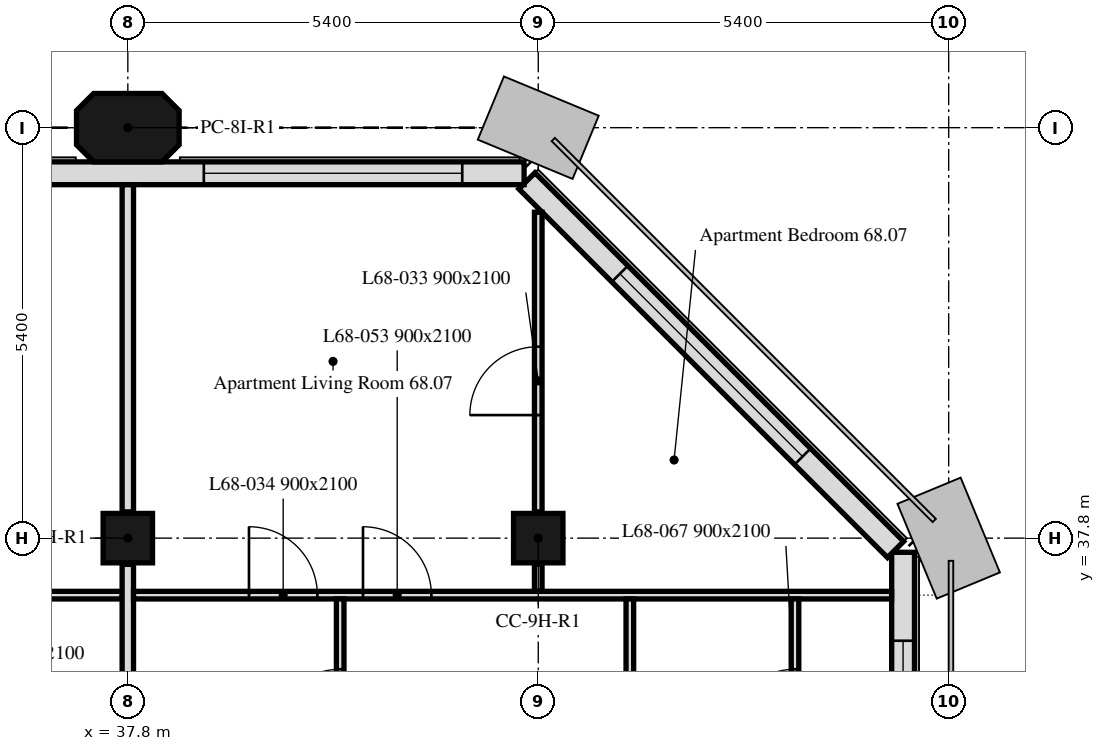
"""IFC4 building model, lengths in metres.
Left out: names, types, materials, properties, quantities, classifications, styles, units other than length and angle.
Written with IfcOpenShell. Run it as: python <this file> out.ifc"""

import sys

from ifc_helpers import new_model, si_unit, direction, frame, frame_2d, origin, origin_2d, place, context, subcontext, project, spatial, polyline, rectangle, outline, extrude, element, fill, save


model = new_model("IFC4")
c1 = context("Model", 3, precision=1e-05, world=origin(), true_north=direction((0.0, 1.0)))
c2 = subcontext(c1, "Body", "Model", "MODEL_VIEW")
j1 = project(units=[si_unit("LENGTHUNIT", "METRE"), si_unit("PLANEANGLEUNIT", "RADIAN")], contexts=[c1])
p1 = place(None, origin())
s1 = spatial("IfcSite", under=j1, at=p1, CompositionType="ELEMENT")
p2 = place(p1, origin())
s2 = spatial("IfcBuilding", under=s1, at=p2, CompositionType="ELEMENT")
p3 = place(p2, frame((0.0, 0.0, 278.5)))
s3 = spatial("IfcBuildingStorey", under=s2, at=p3, CompositionType="ELEMENT", Elevation=278.5)
for number, where, z_axis, x_axis in (
    (1, (37.8, 37.8, 0.0), (0.0, 0.0, 1.0), (1.0, 0.0, 0.0)),
    (2, (43.2, 37.8, 0.0), (0.0, 0.0, 1.0), (1.0, 0.0, 0.0)),
):
    element("IfcColumn", number, at=place(p3, frame(where, z_axis=z_axis, x_axis=x_axis)), inside=s3, PredefinedType="COLUMN", context=c2, shape_type="SweptSolid", body=[
        extrude(rectangle(XDim=0.65, YDim=0.65, at=origin_2d()), origin(), (0.0, 0.0, 1.0), 3.0),
    ])
p4 = place(p3, frame((37.8, 43.2, 0.0), z_axis=(0.0, 0.0, 1.0), x_axis=(1.0, 0.0, 0.0)))
e3 = element("IfcColumn", 3, at=p4, inside=s3, PredefinedType="COLUMN", context=c2, shape_type="SweptSolid", body=[
    extrude(outline(polyline([(-0.45, -0.45), (0.45, -0.45), (0.675, -0.225), (0.675, 0.225), (0.45, 0.45), (-0.45, 0.45), (-0.675, 0.225), (-0.675, -0.225), (-0.45, -0.45)])), origin(), (0.0, 0.0, 1.0), 3.0),
])
p5 = place(p3, frame((48.0, 5.586, 0.0), z_axis=(0.0, 0.0, 1.0), x_axis=(0.0, 1.0, 0.0)))
e4 = element("IfcWall", 4, at=p5, inside=s3, PredefinedType="SOLIDWALL", context=c2, shape_type="SweptSolid", body=[
    extrude(rectangle(XDim=32.027, YDim=0.3, at=frame_2d((16.014, 0.0))), origin(), (0.0, 0.0, 1.0), 3.0),
])
p6 = place(p5, frame((1.789, 0.0, 0.9)))
e5 = element("IfcOpeningElement", 5, at=p6, cuts=e4, PredefinedType="OPENING", context=c2, shape_type="SweptSolid", body=[
    extrude(rectangle(XDim=0.65, YDim=1.7, at=frame_2d((0.325, 0.85))), frame((0.0, 0.16, 0.0), z_axis=(0.0, -1.0, 0.0), x_axis=(1.0, 0.0, 0.0)), (0.0, 0.0, 1.0), 0.32),
])
p7 = place(p5, frame((2.764, 0.0, 0.9)))
e6 = element("IfcOpeningElement", 6, at=p7, cuts=e4, PredefinedType="OPENING", context=c2, shape_type="SweptSolid", body=[
    extrude(rectangle(XDim=1.1, YDim=1.7, at=frame_2d((0.55, 0.85))), frame((0.0, 0.16, 0.0), z_axis=(0.0, -1.0, 0.0), x_axis=(1.0, 0.0, 0.0)), (0.0, 0.0, 1.0), 0.32),
])
p8 = place(p5, frame((6.564, 0.0, 0.9)))
e7 = element("IfcOpeningElement", 7, at=p8, cuts=e4, PredefinedType="OPENING", context=c2, shape_type="SweptSolid", body=[
    extrude(rectangle(XDim=1.1, YDim=1.7, at=frame_2d((0.55, 0.85))), frame((0.0, 0.16, 0.0), z_axis=(0.0, -1.0, 0.0), x_axis=(1.0, 0.0, 0.0)), (0.0, 0.0, 1.0), 0.32),
])
p9 = place(p5, frame((7.989, 0.0, 0.9)))
e8 = element("IfcOpeningElement", 8, at=p9, cuts=e4, PredefinedType="OPENING", context=c2, shape_type="SweptSolid", body=[
    extrude(rectangle(XDim=0.65, YDim=1.7, at=frame_2d((0.325, 0.85))), frame((0.0, 0.16, 0.0), z_axis=(0.0, -1.0, 0.0), x_axis=(1.0, 0.0, 0.0)), (0.0, 0.0, 1.0), 0.32),
])
p10 = place(p5, frame((11.614, 0.0, 0.9)))
e9 = element("IfcOpeningElement", 9, at=p10, cuts=e4, PredefinedType="OPENING", context=c2, shape_type="SweptSolid", body=[
    extrude(rectangle(XDim=3.4, YDim=1.7, at=frame_2d((1.7, 0.85))), frame((0.0, 0.16, 0.0), z_axis=(0.0, -1.0, 0.0), x_axis=(1.0, 0.0, 0.0)), (0.0, 0.0, 1.0), 0.32),
])
p11 = place(p5, frame((17.364, 0.0, 0.9)))
e10 = element("IfcOpeningElement", 10, at=p11, cuts=e4, PredefinedType="OPENING", context=c2, shape_type="SweptSolid", body=[
    extrude(rectangle(XDim=1.1, YDim=1.7, at=frame_2d((0.55, 0.85))), frame((0.0, 0.16, 0.0), z_axis=(0.0, -1.0, 0.0), x_axis=(1.0, 0.0, 0.0)), (0.0, 0.0, 1.0), 0.32),
])
p12 = place(p5, frame((18.964, 0.0, 0.9)))
e11 = element("IfcOpeningElement", 11, at=p12, cuts=e4, PredefinedType="OPENING", context=c2, shape_type="SweptSolid", body=[
    extrude(rectangle(XDim=1.1, YDim=1.7, at=frame_2d((0.55, 0.85))), frame((0.0, 0.16, 0.0), z_axis=(0.0, -1.0, 0.0), x_axis=(1.0, 0.0, 0.0)), (0.0, 0.0, 1.0), 0.32),
])
p13 = place(p5, frame((22.414, 0.0, 0.9)))
e12 = element("IfcOpeningElement", 12, at=p13, cuts=e4, PredefinedType="OPENING", context=c2, shape_type="SweptSolid", body=[
    extrude(rectangle(XDim=3.4, YDim=1.7, at=frame_2d((1.7, 0.85))), frame((0.0, 0.16, 0.0), z_axis=(0.0, -1.0, 0.0), x_axis=(1.0, 0.0, 0.0)), (0.0, 0.0, 1.0), 0.32),
])
p14 = place(p5, frame((28.789, 0.0, 0.9)))
e13 = element("IfcOpeningElement", 13, at=p14, cuts=e4, PredefinedType="OPENING", context=c2, shape_type="SweptSolid", body=[
    extrude(rectangle(XDim=0.65, YDim=1.7, at=frame_2d((0.325, 0.85))), frame((0.0, 0.16, 0.0), z_axis=(0.0, -1.0, 0.0), x_axis=(1.0, 0.0, 0.0)), (0.0, 0.0, 1.0), 0.32),
])
p15 = place(p5, frame((29.764, 0.0, 0.9)))
e14 = element("IfcOpeningElement", 14, at=p15, cuts=e4, PredefinedType="OPENING", context=c2, shape_type="SweptSolid", body=[
    extrude(rectangle(XDim=1.1, YDim=1.7, at=frame_2d((0.55, 0.85))), frame((0.0, 0.16, 0.0), z_axis=(0.0, -1.0, 0.0), x_axis=(1.0, 0.0, 0.0)), (0.0, 0.0, 1.0), 0.32),
])
p16 = place(p3, frame((47.901, 37.65, 0.0), z_axis=(0.0, 0.0, 1.0), x_axis=(-0.707106781187, 0.707106781187, 0.0)))
e15 = element("IfcWall", 15, at=p16, inside=s3, PredefinedType="SOLIDWALL", context=c2, shape_type="SweptSolid", body=[
    extrude(rectangle(XDim=6.86, YDim=0.3, at=frame_2d((3.43, 0.0))), origin(), (0.0, 0.0, 1.0), 3.0),
])
p17 = place(p16, frame((1.73, 0.0, 0.9)))
e16 = element("IfcOpeningElement", 16, at=p17, cuts=e15, PredefinedType="OPENING", context=c2, shape_type="SweptSolid", body=[
    extrude(rectangle(XDim=3.4, YDim=1.7, at=frame_2d((1.7, 0.85))), frame((0.0, 0.16, 0.0), z_axis=(0.0, -1.0, 0.0), x_axis=(1.0, 0.0, 0.0)), (0.0, 0.0, 1.0), 0.32),
])
p18 = place(p3, frame((43.014, 42.6, 0.0), z_axis=(0.0, 0.0, 1.0), x_axis=(-1.0, 0.0, 0.0)))
e17 = element("IfcWall", 17, at=p18, inside=s3, PredefinedType="SOLIDWALL", context=c2, shape_type="SweptSolid", body=[
    extrude(rectangle(XDim=32.027, YDim=0.3, at=frame_2d((16.014, 0.0))), origin(), (0.0, 0.0, 1.0), 3.0),
])
p19 = place(p18, frame((0.814, 0.0, 0.9)))
e18 = element("IfcOpeningElement", 18, at=p19, cuts=e17, PredefinedType="OPENING", context=c2, shape_type="SweptSolid", body=[
    extrude(rectangle(XDim=3.4, YDim=1.7, at=frame_2d((1.7, 0.85))), frame((0.0, 0.16, 0.0), z_axis=(0.0, -1.0, 0.0), x_axis=(1.0, 0.0, 0.0)), (0.0, 0.0, 1.0), 0.32),
])
p20 = place(p18, frame((6.564, 0.0, 0.9)))
e19 = element("IfcOpeningElement", 19, at=p20, cuts=e17, PredefinedType="OPENING", context=c2, shape_type="SweptSolid", body=[
    extrude(rectangle(XDim=1.1, YDim=1.7, at=frame_2d((0.55, 0.85))), frame((0.0, 0.16, 0.0), z_axis=(0.0, -1.0, 0.0), x_axis=(1.0, 0.0, 0.0)), (0.0, 0.0, 1.0), 0.32),
])
p21 = place(p18, frame((11.614, 0.0, 0.9)))
e20 = element("IfcOpeningElement", 20, at=p21, cuts=e17, PredefinedType="OPENING", context=c2, shape_type="SweptSolid", body=[
    extrude(rectangle(XDim=3.4, YDim=1.7, at=frame_2d((1.7, 0.85))), frame((0.0, 0.16, 0.0), z_axis=(0.0, -1.0, 0.0), x_axis=(1.0, 0.0, 0.0)), (0.0, 0.0, 1.0), 0.32),
])
p22 = place(p18, frame((17.364, 0.0, 0.9)))
e21 = element("IfcOpeningElement", 21, at=p22, cuts=e17, PredefinedType="OPENING", context=c2, shape_type="SweptSolid", body=[
    extrude(rectangle(XDim=1.1, YDim=1.7, at=frame_2d((0.55, 0.85))), frame((0.0, 0.16, 0.0), z_axis=(0.0, -1.0, 0.0), x_axis=(1.0, 0.0, 0.0)), (0.0, 0.0, 1.0), 0.32),
])
p23 = place(p18, frame((22.414, 0.0, 0.9)))
e22 = element("IfcOpeningElement", 22, at=p23, cuts=e17, PredefinedType="OPENING", context=c2, shape_type="SweptSolid", body=[
    extrude(rectangle(XDim=3.4, YDim=1.7, at=frame_2d((1.7, 0.85))), frame((0.0, 0.16, 0.0), z_axis=(0.0, -1.0, 0.0), x_axis=(1.0, 0.0, 0.0)), (0.0, 0.0, 1.0), 0.32),
])
p24 = place(p18, frame((28.164, 0.0, 0.9)))
e23 = element("IfcOpeningElement", 23, at=p24, cuts=e17, PredefinedType="OPENING", context=c2, shape_type="SweptSolid", body=[
    extrude(rectangle(XDim=1.1, YDim=1.7, at=frame_2d((0.55, 0.85))), frame((0.0, 0.16, 0.0), z_axis=(0.0, -1.0, 0.0), x_axis=(1.0, 0.0, 0.0)), (0.0, 0.0, 1.0), 0.32),
])
p25 = place(p3, frame((27.075, 37.05, 0.0), z_axis=(0.0, 0.0, 1.0), x_axis=(1.0, 0.0, 0.0)))
e24 = element("IfcWall", 24, at=p25, inside=s3, PredefinedType="PARTITIONING", context=c2, shape_type="SweptSolid", body=[
    extrude(rectangle(XDim=10.65, YDim=0.1, at=frame_2d((5.325, 0.0))), origin(), (0.0, 0.0, 1.0), 3.0),
])
p26 = place(p25, frame((7.946, 0.0, 0.0)))
e25 = element("IfcOpeningElement", 25, at=p26, cuts=e24, PredefinedType="OPENING", context=c2, shape_type="SweptSolid", body=[
    extrude(rectangle(XDim=0.9, YDim=2.1, at=frame_2d((0.45, 1.05))), frame((0.0, 0.05, 0.0), z_axis=(0.0, -1.0, 0.0), x_axis=(1.0, 0.0, 0.0)), (0.0, 0.0, 1.0), 0.1),
])
p27 = place(p25, frame((1.46, 0.0, 0.0)))
e26 = element("IfcOpeningElement", 26, at=p27, cuts=e24, PredefinedType="OPENING", context=c2, shape_type="SweptSolid", body=[
    extrude(rectangle(XDim=0.9, YDim=2.1, at=frame_2d((0.45, 1.05))), frame((0.0, 0.05, 0.0), z_axis=(0.0, -1.0, 0.0), x_axis=(1.0, 0.0, 0.0)), (0.0, 0.0, 1.0), 0.1),
])
p28 = place(p25, frame((2.96, 0.0, 0.0)))
e27 = element("IfcOpeningElement", 27, at=p28, cuts=e24, PredefinedType="OPENING", context=c2, shape_type="SweptSolid", body=[
    extrude(rectangle(XDim=0.9, YDim=2.1, at=frame_2d((0.45, 1.05))), frame((0.0, 0.05, 0.0), z_axis=(0.0, -1.0, 0.0), x_axis=(1.0, 0.0, 0.0)), (0.0, 0.0, 1.0), 0.1),
])
p29 = place(p3, frame((37.8, 38.145, 0.0), z_axis=(0.0, 0.0, 1.0), x_axis=(0.0, 1.0, 0.0)))
e28 = element("IfcWall", 28, at=p29, inside=s3, PredefinedType="PARTITIONING", context=c2, shape_type="SweptSolid", body=[
    extrude(rectangle(XDim=4.304, YDim=0.15, at=frame_2d((2.152, 0.0))), origin(), (0.0, 0.0, 1.0), 3.0),
])
p30 = place(p3, frame((37.8, 34.275, 0.0), z_axis=(0.0, 0.0, 1.0), x_axis=(0.0, 1.0, 0.0)))
e29 = element("IfcWall", 29, at=p30, inside=s3, PredefinedType="PARTITIONING", context=c2, shape_type="SweptSolid", body=[
    extrude(rectangle(XDim=3.18, YDim=0.15, at=frame_2d((1.59, 0.0))), origin(), (0.0, 0.0, 1.0), 3.0),
])
p31 = place(p3, frame((43.2, 37.1, 0.0), z_axis=(0.0, 0.0, 1.0), x_axis=(0.0, 1.0, 0.0)))
e30 = element("IfcWall", 30, at=p31, inside=s3, PredefinedType="PARTITIONING", context=c2, shape_type="SweptSolid", body=[
    extrude(rectangle(XDim=0.355, YDim=0.1, at=frame_2d((0.177, 0.0))), origin(), (0.0, 0.0, 1.0), 3.0),
])
p32 = place(p3, frame((43.2, 38.145, 0.0), z_axis=(0.0, 0.0, 1.0), x_axis=(0.0, 1.0, 0.0)))
e31 = element("IfcWall", 31, at=p32, inside=s3, PredefinedType="PARTITIONING", context=c2, shape_type="SweptSolid", body=[
    extrude(rectangle(XDim=3.943, YDim=0.1, at=frame_2d((1.971, 0.0))), origin(), (0.0, 0.0, 1.0), 3.0),
])
p33 = place(p32, frame((1.274, 0.0, 0.0)))
e32 = element("IfcOpeningElement", 32, at=p33, cuts=e31, PredefinedType="OPENING", context=c2, shape_type="SweptSolid", body=[
    extrude(rectangle(XDim=0.9, YDim=2.1, at=frame_2d((0.45, 1.05))), frame((0.0, 0.05, 0.0), z_axis=(0.0, -1.0, 0.0), x_axis=(1.0, 0.0, 0.0)), (0.0, 0.0, 1.0), 0.1),
])
p34 = place(p3, frame((37.875, 37.05, 0.0), z_axis=(0.0, 0.0, 1.0), x_axis=(1.0, 0.0, 0.0)))
e33 = element("IfcWall", 33, at=p34, inside=s3, PredefinedType="PARTITIONING", context=c2, shape_type="SweptSolid", body=[
    extrude(rectangle(XDim=9.974, YDim=0.1, at=frame_2d((4.987, 0.0))), origin(), (0.0, 0.0, 1.0), 3.0),
])
p35 = place(p34, frame((1.519, 0.0, 0.0)))
e34 = element("IfcOpeningElement", 34, at=p35, cuts=e33, PredefinedType="OPENING", context=c2, shape_type="SweptSolid", body=[
    extrude(rectangle(XDim=0.9, YDim=2.1, at=frame_2d((0.45, 1.05))), frame((0.0, 0.05, 0.0), z_axis=(0.0, -1.0, 0.0), x_axis=(1.0, 0.0, 0.0)), (0.0, 0.0, 1.0), 0.1),
])
p36 = place(p34, frame((3.019, 0.0, 0.0)))
e35 = element("IfcOpeningElement", 35, at=p36, cuts=e33, PredefinedType="OPENING", context=c2, shape_type="SweptSolid", body=[
    extrude(rectangle(XDim=0.9, YDim=2.1, at=frame_2d((0.45, 1.05))), frame((0.0, 0.05, 0.0), z_axis=(0.0, -1.0, 0.0), x_axis=(1.0, 0.0, 0.0)), (0.0, 0.0, 1.0), 0.1),
])
p37 = place(p3, frame((40.594, 34.275, 0.0), z_axis=(0.0, 0.0, 1.0), x_axis=(0.0, 1.0, 0.0)))
e36 = element("IfcWall", 36, at=p37, inside=s3, PredefinedType="PARTITIONING", context=c2, shape_type="SweptSolid", body=[
    extrude(rectangle(XDim=2.725, YDim=0.1, at=frame_2d((1.363, 0.0))), origin(), (0.0, 0.0, 1.0), 3.0),
])
p38 = place(p37, frame((0.9, 0.0, 0.0)))
e37 = element("IfcOpeningElement", 37, at=p38, cuts=e36, PredefinedType="OPENING", context=c2, shape_type="SweptSolid", body=[
    extrude(rectangle(XDim=0.9, YDim=2.1, at=frame_2d((0.45, 1.05))), frame((0.0, 0.05, 0.0), z_axis=(0.0, -1.0, 0.0), x_axis=(1.0, 0.0, 0.0)), (0.0, 0.0, 1.0), 0.1),
])
p39 = place(p3, frame((44.405, 34.275, 0.0), z_axis=(0.0, 0.0, 1.0), x_axis=(0.0, 1.0, 0.0)))
e38 = element("IfcWall", 38, at=p39, inside=s3, PredefinedType="PARTITIONING", context=c2, shape_type="SweptSolid", body=[
    extrude(rectangle(XDim=2.725, YDim=0.1, at=frame_2d((1.363, 0.0))), origin(), (0.0, 0.0, 1.0), 3.0),
])
p40 = place(p39, frame((0.281, 0.0, 0.0)))
e39 = element("IfcOpeningElement", 39, at=p40, cuts=e38, PredefinedType="OPENING", context=c2, shape_type="SweptSolid", body=[
    extrude(rectangle(XDim=0.9, YDim=2.1, at=frame_2d((0.45, 1.05))), frame((0.0, 0.05, 0.0), z_axis=(0.0, -1.0, 0.0), x_axis=(1.0, 0.0, 0.0)), (0.0, 0.0, 1.0), 0.1),
])
p41 = place(p3, frame((46.578, 34.275, 0.0), z_axis=(0.0, 0.0, 1.0), x_axis=(0.0, 1.0, 0.0)))
e40 = element("IfcWall", 40, at=p41, inside=s3, PredefinedType="PARTITIONING", context=c2, shape_type="SweptSolid", body=[
    extrude(rectangle(XDim=2.725, YDim=0.1, at=frame_2d((1.363, 0.0))), origin(), (0.0, 0.0, 1.0), 3.0),
])
p42 = place(p41, frame((0.9, 0.0, 0.0)))
e41 = element("IfcOpeningElement", 41, at=p42, cuts=e40, PredefinedType="OPENING", context=c2, shape_type="SweptSolid", body=[
    extrude(rectangle(XDim=0.9, YDim=2.1, at=frame_2d((0.45, 1.05))), frame((0.0, 0.05, 0.0), z_axis=(0.0, -1.0, 0.0), x_axis=(1.0, 0.0, 0.0)), (0.0, 0.0, 1.0), 0.1),
])
p43 = place(p15, origin())
e42 = element("IfcWindow", 42, at=p43, inside=s3, PartitioningType="SINGLE_PANEL", PredefinedType="WINDOW", context=c2, shape_type="SweptSolid", body=[
    extrude(rectangle(XDim=1.1, YDim=1.7, at=frame_2d((0.55, 0.85))), frame((0.0, 0.03, 0.0), z_axis=(0.0, -1.0, 0.0), x_axis=(1.0, 0.0, 0.0)), (0.0, 0.0, 1.0), 0.06),
])
fill(e14, e42)
p44 = place(p17, origin())
e43 = element("IfcWindow", 43, at=p44, inside=s3, PartitioningType="SINGLE_PANEL", PredefinedType="WINDOW", context=c2, shape_type="SweptSolid", body=[
    extrude(rectangle(XDim=3.4, YDim=1.7, at=frame_2d((1.7, 0.85))), frame((0.0, 0.03, 0.0), z_axis=(0.0, -1.0, 0.0), x_axis=(1.0, 0.0, 0.0)), (0.0, 0.0, 1.0), 0.06),
])
fill(e16, e43)
p45 = place(p19, origin())
e44 = element("IfcWindow", 44, at=p45, inside=s3, PartitioningType="SINGLE_PANEL", PredefinedType="WINDOW", context=c2, shape_type="SweptSolid", body=[
    extrude(rectangle(XDim=3.4, YDim=1.7, at=frame_2d((1.7, 0.85))), frame((0.0, 0.03, 0.0), z_axis=(0.0, -1.0, 0.0), x_axis=(1.0, 0.0, 0.0)), (0.0, 0.0, 1.0), 0.06),
])
fill(e18, e44)
p46 = place(p33, origin())
e45 = element("IfcDoor", 45, at=p46, inside=s3, OperationType="SINGLE_SWING_LEFT", PredefinedType="DOOR", context=c2, shape_type="SweptSolid", body=[
    extrude(rectangle(XDim=0.9, YDim=2.1, at=frame_2d((0.45, 1.05))), frame((0.0, 0.025, 0.0), z_axis=(0.0, -1.0, 0.0), x_axis=(1.0, 0.0, 0.0)), (0.0, 0.0, 1.0), 0.05),
])
fill(e32, e45)
p47 = place(p35, origin())
e46 = element("IfcDoor", 46, at=p47, inside=s3, OperationType="SINGLE_SWING_LEFT", PredefinedType="DOOR", context=c2, shape_type="SweptSolid", body=[
    extrude(rectangle(XDim=0.9, YDim=2.1, at=frame_2d((0.45, 1.05))), frame((0.0, 0.025, 0.0), z_axis=(0.0, -1.0, 0.0), x_axis=(1.0, 0.0, 0.0)), (0.0, 0.0, 1.0), 0.05),
])
fill(e34, e46)
p48 = place(p38, origin())
e47 = element("IfcDoor", 47, at=p48, inside=s3, OperationType="SINGLE_SWING_RIGHT", PredefinedType="DOOR", context=c2, shape_type="SweptSolid", body=[
    extrude(rectangle(XDim=0.9, YDim=2.1, at=frame_2d((0.45, 1.05))), frame((0.0, 0.025, 0.0), z_axis=(0.0, -1.0, 0.0), x_axis=(1.0, 0.0, 0.0)), (0.0, 0.0, 1.0), 0.05),
])
fill(e37, e47)
p49 = place(p36, origin())
e48 = element("IfcDoor", 48, at=p49, inside=s3, OperationType="SINGLE_SWING_RIGHT", PredefinedType="DOOR", context=c2, shape_type="SweptSolid", body=[
    extrude(rectangle(XDim=0.9, YDim=2.1, at=frame_2d((0.45, 1.05))), frame((0.0, 0.025, 0.0), z_axis=(0.0, -1.0, 0.0), x_axis=(1.0, 0.0, 0.0)), (0.0, 0.0, 1.0), 0.05),
])
fill(e35, e48)
p50 = place(p42, origin())
e49 = element("IfcDoor", 49, at=p50, inside=s3, OperationType="SINGLE_SWING_LEFT", PredefinedType="DOOR", context=c2, shape_type="SweptSolid", body=[
    extrude(rectangle(XDim=0.9, YDim=2.1, at=frame_2d((0.45, 1.05))), frame((0.0, 0.025, 0.0), z_axis=(0.0, -1.0, 0.0), x_axis=(1.0, 0.0, 0.0)), (0.0, 0.0, 1.0), 0.05),
])
fill(e41, e49)
save(model, sys.argv[1])
